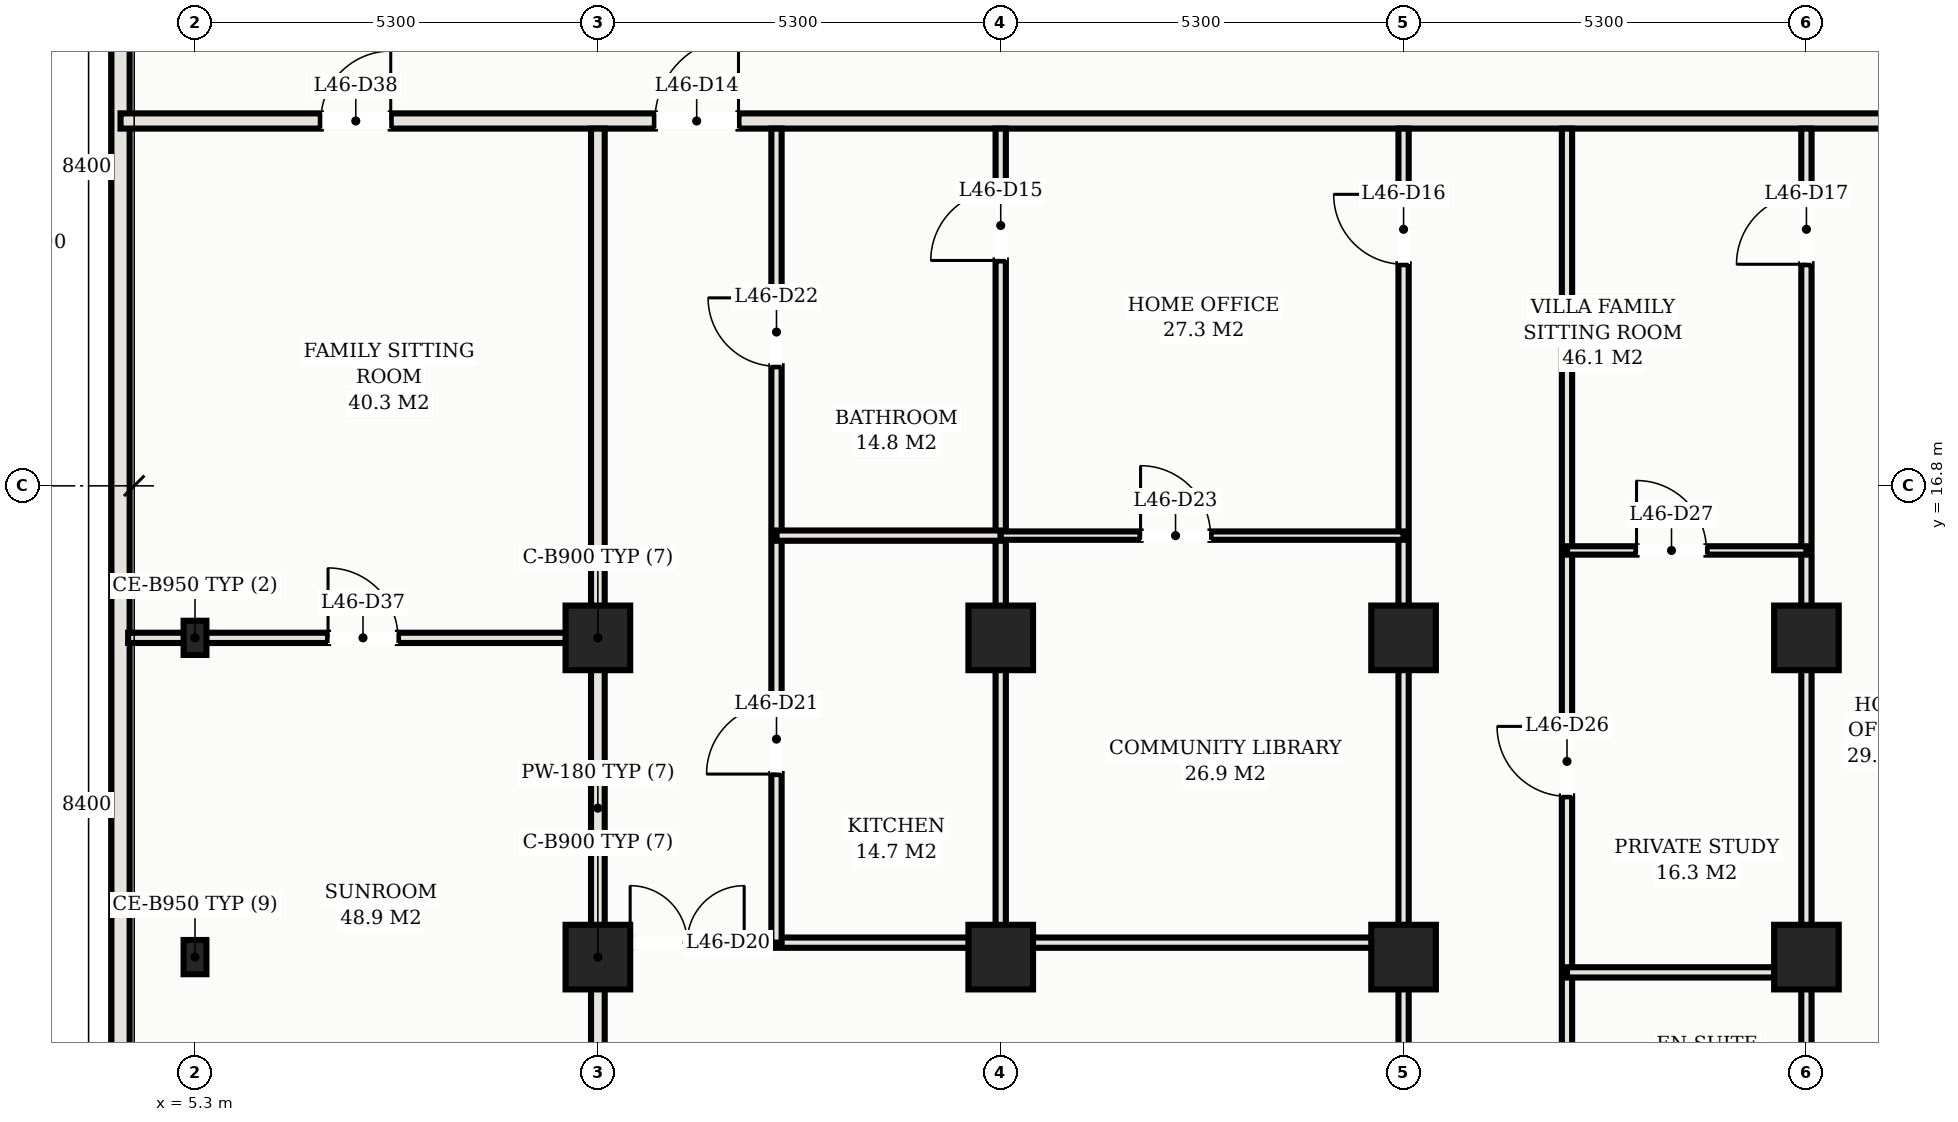
"""IFC4 building model, lengths in metres.
Left out: names, types, materials, properties, quantities, classifications, styles, units other than length and angle.
Written with IfcOpenShell. Run it as: python <this file> out.ifc"""

import sys

from ifc_helpers import new_model, si_unit, direction, frame, frame_2d, origin, origin_2d, place, context, subcontext, project, spatial, rectangle, hollow_rectangle, extrude, element, fill, save


model = new_model("IFC4")
c1 = context("Model", 3, precision=1e-05, world=origin(), true_north=direction((0.0, 1.0)))
c2 = subcontext(c1, "Body", "Model", "MODEL_VIEW")
j1 = project(units=[si_unit("LENGTHUNIT", "METRE"), si_unit("PLANEANGLEUNIT", "RADIAN")], contexts=[c1])
p1 = place(None, origin())
s1 = spatial("IfcSite", under=j1, at=p1, CompositionType="ELEMENT")
p2 = place(p1, origin())
s2 = spatial("IfcBuilding", under=s1, at=p2, CompositionType="ELEMENT")
p3 = place(p2, frame((0.0, 0.0, 168.9)))
s3 = spatial("IfcBuildingStorey", under=s2, at=p3, CompositionType="ELEMENT", Elevation=168.9)
for number, where, z_axis, x_axis in (
    (1, (10.6, 14.8, 0.0), (0.0, 0.0, 1.0), (1.0, 0.0, 0.0)),
    (2, (10.6, 10.6, 0.0), (0.0, 0.0, 1.0), (1.0, 0.0, 0.0)),
    (3, (15.9, 14.8, 0.0), (0.0, 0.0, 1.0), (1.0, 0.0, 0.0)),
    (4, (15.9, 10.6, 0.0), (0.0, 0.0, 1.0), (1.0, 0.0, 0.0)),
    (5, (21.2, 14.8, 0.0), (0.0, 0.0, 1.0), (1.0, 0.0, 0.0)),
    (6, (21.2, 10.6, 0.0), (0.0, 0.0, 1.0), (1.0, 0.0, 0.0)),
    (7, (26.5, 14.8, 0.0), (0.0, 0.0, 1.0), (1.0, 0.0, 0.0)),
    (8, (26.5, 10.6, 0.0), (0.0, 0.0, 1.0), (1.0, 0.0, 0.0)),
):
    element("IfcColumn", number, at=place(p3, frame(where, z_axis=z_axis, x_axis=x_axis)), inside=s3, PredefinedType="COLUMN", context=c2, shape_type="SweptSolid", body=[
        extrude(hollow_rectangle(XDim=0.85, YDim=0.85, WallThickness=0.028, at=origin_2d()), origin(), (0.0, 0.0, 1.0), 3.3),
    ])
for number, where, z_axis, x_axis in (
    (9, (5.3, 10.6, 0.0), (0.0, 0.0, 1.0), (1.0, 0.0, 0.0)),
    (10, (5.3, 14.8, 0.0), (0.0, 0.0, 1.0), (1.0, 0.0, 0.0)),
):
    element("IfcColumn", number, at=place(p3, frame(where, z_axis=z_axis, x_axis=x_axis)), inside=s3, PredefinedType="COLUMN", context=c2, shape_type="SweptSolid", body=[
        extrude(hollow_rectangle(XDim=0.3, YDim=0.45, WallThickness=0.016, at=origin_2d()), origin(), (0.0, 0.0, 1.0), 3.3),
    ])
p4 = place(p3, frame((4.32, 35.93, 0.0), z_axis=(0.0, 0.0, 1.0), x_axis=(0.0, -1.0, 0.0)))
e11 = element("IfcWall", 11, at=p4, inside=s3, PredefinedType="SOLIDWALL", context=c2, shape_type="SweptSolid", body=[
    extrude(rectangle(XDim=27.41, YDim=0.24, at=frame_2d((13.705, 0.0))), origin(), (0.0, 0.0, 1.0), 3.1),
])
p5 = place(p3, frame((4.32, 21.6, 0.0), z_axis=(0.0, 0.0, 1.0), x_axis=(1.0, 0.0, 0.0)))
e12 = element("IfcWall", 12, at=p5, inside=s3, PredefinedType="PARTITIONING", context=c2, shape_type="SweptSolid", body=[
    extrude(rectangle(XDim=44.36, YDim=0.2, at=frame_2d((22.18, 0.0))), origin(), (0.0, 0.0, 1.0), 2.38),
])
p6 = place(p5, frame((7.03, 0.0, 0.0)))
e13 = element("IfcOpeningElement", 13, at=p6, cuts=e12, PredefinedType="OPENING", context=c2, shape_type="SweptSolid", body=[
    extrude(rectangle(XDim=1.1, YDim=2.25, at=frame_2d((0.55, 1.125))), frame((0.0, 0.11, 0.0), z_axis=(0.0, -1.0, 0.0), x_axis=(1.0, 0.0, 0.0)), (0.0, 0.0, 1.0), 0.22),
])
p7 = place(p5, frame((2.635, 0.0, 0.0)))
e14 = element("IfcOpeningElement", 14, at=p7, cuts=e12, PredefinedType="OPENING", context=c2, shape_type="SweptSolid", body=[
    extrude(rectangle(XDim=0.92, YDim=2.15, at=frame_2d((0.46, 1.075))), frame((0.0, 0.11, 0.0), z_axis=(0.0, -1.0, 0.0), x_axis=(1.0, 0.0, 0.0)), (0.0, 0.0, 1.0), 0.22),
])
p8 = place(p5, frame((40.805, 0.0, 0.0)))
e15 = element("IfcOpeningElement", 15, at=p8, cuts=e12, PredefinedType="OPENING", context=c2, shape_type="SweptSolid", body=[
    extrude(rectangle(XDim=0.92, YDim=2.15, at=frame_2d((0.46, 1.075))), frame((0.0, 0.11, 0.0), z_axis=(0.0, -1.0, 0.0), x_axis=(1.0, 0.0, 0.0)), (0.0, 0.0, 1.0), 0.22),
])
p9 = place(p3, frame((10.6, 3.62, 0.0), z_axis=(0.0, 0.0, 1.0), x_axis=(0.0, 1.0, 0.0)))
e16 = element("IfcWall", 16, at=p9, inside=s3, PredefinedType="PARTITIONING", context=c2, shape_type="SweptSolid", body=[
    extrude(rectangle(XDim=17.88, YDim=0.18, at=frame_2d((8.94, 0.0))), origin(), (0.0, 0.0, 1.0), 2.38),
])
p10 = place(p3, frame((15.9, 14.8, 0.0), z_axis=(0.0, 0.0, 1.0), x_axis=(0.0, 1.0, 0.0)))
e17 = element("IfcWall", 17, at=p10, inside=s3, PredefinedType="PARTITIONING", context=c2, shape_type="SweptSolid", body=[
    extrude(rectangle(XDim=6.7, YDim=0.135, at=frame_2d((3.35, 0.0))), origin(), (0.0, 0.0, 1.0), 2.38),
])
p11 = place(p10, frame((4.965, 0.0, 0.0)))
e18 = element("IfcOpeningElement", 18, at=p11, cuts=e17, PredefinedType="OPENING", context=c2, shape_type="SweptSolid", body=[
    extrude(rectangle(XDim=0.92, YDim=2.15, at=frame_2d((0.46, 1.075))), frame((0.0, 0.078, 0.0), z_axis=(0.0, -1.0, 0.0), x_axis=(1.0, 0.0, 0.0)), (0.0, 0.0, 1.0), 0.155),
])
p12 = place(p3, frame((21.2, 2.508, 0.0), z_axis=(0.0, 0.0, 1.0), x_axis=(0.0, 1.0, 0.0)))
e19 = element("IfcWall", 19, at=p12, inside=s3, PredefinedType="PARTITIONING", context=c2, shape_type="SweptSolid", body=[
    extrude(rectangle(XDim=18.992, YDim=0.135, at=frame_2d((9.496, 0.0))), origin(), (0.0, 0.0, 1.0), 2.38),
])
p13 = place(p12, frame((17.207, 0.0, 0.0)))
e20 = element("IfcOpeningElement", 20, at=p13, cuts=e19, PredefinedType="OPENING", context=c2, shape_type="SweptSolid", body=[
    extrude(rectangle(XDim=0.92, YDim=2.15, at=frame_2d((0.46, 1.075))), frame((0.0, 0.078, 0.0), z_axis=(0.0, -1.0, 0.0), x_axis=(1.0, 0.0, 0.0)), (0.0, 0.0, 1.0), 0.155),
])
p14 = place(p3, frame((26.5, 1.82, 0.0), z_axis=(0.0, 0.0, 1.0), x_axis=(0.0, 1.0, 0.0)))
e21 = element("IfcWall", 21, at=p14, inside=s3, PredefinedType="PARTITIONING", context=c2, shape_type="SweptSolid", body=[
    extrude(rectangle(XDim=19.68, YDim=0.135, at=frame_2d((9.84, 0.0))), origin(), (0.0, 0.0, 1.0), 2.38),
])
p15 = place(p14, frame((17.895, 0.0, 0.0)))
e22 = element("IfcOpeningElement", 22, at=p15, cuts=e21, PredefinedType="OPENING", context=c2, shape_type="SweptSolid", body=[
    extrude(rectangle(XDim=0.92, YDim=2.15, at=frame_2d((0.46, 1.075))), frame((0.0, 0.078, 0.0), z_axis=(0.0, -1.0, 0.0), x_axis=(1.0, 0.0, 0.0)), (0.0, 0.0, 1.0), 0.155),
])
p16 = place(p3, frame((15.9, 10.79, 0.0), z_axis=(0.0, 0.0, 1.0), x_axis=(0.0, 1.0, 0.0)))
e23 = element("IfcWall", 23, at=p16, inside=s3, PredefinedType="PARTITIONING", context=c2, shape_type="SweptSolid", body=[
    extrude(rectangle(XDim=4.01, YDim=0.135, at=frame_2d((2.005, 0.0))), origin(), (0.0, 0.0, 1.0), 2.38),
])
p17 = place(p3, frame((10.6, 10.79, 0.0), z_axis=(0.0, 0.0, 1.0), x_axis=(1.0, 0.0, 0.0)))
e24 = element("IfcWall", 24, at=p17, inside=s3, PredefinedType="PARTITIONING", context=c2, shape_type="SweptSolid", body=[
    extrude(rectangle(XDim=10.6, YDim=0.135, at=frame_2d((5.3, 0.0))), origin(), (0.0, 0.0, 1.0), 2.38),
])
p18 = place(p17, frame((0.425, 0.0, 0.0)))
e25 = element("IfcOpeningElement", 25, at=p18, cuts=e24, PredefinedType="OPENING", context=c2, shape_type="SweptSolid", body=[
    extrude(rectangle(XDim=1.5, YDim=2.25, at=frame_2d((0.75, 1.125))), frame((0.0, 0.078, 0.0), z_axis=(0.0, -1.0, 0.0), x_axis=(1.0, 0.0, 0.0)), (0.0, 0.0, 1.0), 0.155),
])
p19 = place(p3, frame((12.95, 10.79, 0.0), z_axis=(0.0, 0.0, 1.0), x_axis=(0.0, 1.0, 0.0)))
e26 = element("IfcWall", 26, at=p19, inside=s3, PredefinedType="PARTITIONING", context=c2, shape_type="SweptSolid", body=[
    extrude(rectangle(XDim=10.71, YDim=0.135, at=frame_2d((5.355, 0.0))), origin(), (0.0, 0.0, 1.0), 2.38),
])
p20 = place(p19, frame((2.218, 0.0, 0.0)))
e27 = element("IfcOpeningElement", 27, at=p20, cuts=e26, PredefinedType="OPENING", context=c2, shape_type="SweptSolid", body=[
    extrude(rectangle(XDim=0.92, YDim=2.15, at=frame_2d((0.46, 1.075))), frame((0.0, 0.078, 0.0), z_axis=(0.0, -1.0, 0.0), x_axis=(1.0, 0.0, 0.0)), (0.0, 0.0, 1.0), 0.155),
])
p21 = place(p19, frame((7.583, 0.0, 0.0)))
e28 = element("IfcOpeningElement", 28, at=p21, cuts=e26, PredefinedType="OPENING", context=c2, shape_type="SweptSolid", body=[
    extrude(rectangle(XDim=0.9, YDim=2.15, at=frame_2d((0.45, 1.075))), frame((0.0, 0.078, 0.0), z_axis=(0.0, -1.0, 0.0), x_axis=(1.0, 0.0, 0.0)), (0.0, 0.0, 1.0), 0.155),
])
p22 = place(p3, frame((12.95, 16.145, 0.0), z_axis=(0.0, 0.0, 1.0), x_axis=(1.0, 0.0, 0.0)))
e29 = element("IfcWall", 29, at=p22, inside=s3, PredefinedType="PARTITIONING", context=c2, shape_type="SweptSolid", body=[
    extrude(rectangle(XDim=2.95, YDim=0.135, at=frame_2d((1.475, 0.0))), origin(), (0.0, 0.0, 1.0), 2.38),
])
p23 = place(p3, frame((15.9, 16.145, 0.0), z_axis=(0.0, 0.0, 1.0), x_axis=(1.0, 0.0, 0.0)))
e30 = element("IfcWall", 30, at=p23, inside=s3, PredefinedType="MOVABLE", context=c2, shape_type="SweptSolid", body=[
    extrude(rectangle(XDim=5.3, YDim=0.11, at=frame_2d((2.65, 0.0))), origin(), (0.0, 0.0, 1.0), 2.38),
])
p24 = place(p23, frame((1.84, 0.0, 0.0)))
e31 = element("IfcOpeningElement", 31, at=p24, cuts=e30, PredefinedType="OPENING", context=c2, shape_type="SweptSolid", body=[
    extrude(rectangle(XDim=0.92, YDim=2.15, at=frame_2d((0.46, 1.075))), frame((0.0, 0.065, 0.0), z_axis=(0.0, -1.0, 0.0), x_axis=(1.0, 0.0, 0.0)), (0.0, 0.0, 1.0), 0.13),
])
p25 = place(p3, frame((23.35, 7.199, 0.0), z_axis=(0.0, 0.0, 1.0), x_axis=(0.0, 1.0, 0.0)))
e32 = element("IfcWall", 32, at=p25, inside=s3, PredefinedType="PARTITIONING", context=c2, shape_type="SweptSolid", body=[
    extrude(rectangle(XDim=14.301, YDim=0.135, at=frame_2d((7.15, 0.0))), origin(), (0.0, 0.0, 1.0), 2.38),
])
p26 = place(p25, frame((5.516, 0.0, 0.0)))
e33 = element("IfcOpeningElement", 33, at=p26, cuts=e32, PredefinedType="OPENING", context=c2, shape_type="SweptSolid", body=[
    extrude(rectangle(XDim=0.92, YDim=2.15, at=frame_2d((0.46, 1.075))), frame((0.0, 0.078, 0.0), z_axis=(0.0, -1.0, 0.0), x_axis=(1.0, 0.0, 0.0)), (0.0, 0.0, 1.0), 0.155),
])
p27 = place(p3, frame((23.35, 10.399, 0.0), z_axis=(0.0, 0.0, 1.0), x_axis=(1.0, 0.0, 0.0)))
e34 = element("IfcWall", 34, at=p27, inside=s3, PredefinedType="PARTITIONING", context=c2, shape_type="SweptSolid", body=[
    extrude(rectangle(XDim=3.15, YDim=0.135, at=frame_2d((1.575, 0.0))), origin(), (0.0, 0.0, 1.0), 2.38),
])
p28 = place(p3, frame((23.35, 15.95, 0.0), z_axis=(0.0, 0.0, 1.0), x_axis=(1.0, 0.0, 0.0)))
e35 = element("IfcWall", 35, at=p28, inside=s3, PredefinedType="MOVABLE", context=c2, shape_type="SweptSolid", body=[
    extrude(rectangle(XDim=3.15, YDim=0.11, at=frame_2d((1.575, 0.0))), origin(), (0.0, 0.0, 1.0), 2.38),
])
p29 = place(p28, frame((0.915, 0.0, 0.0)))
e36 = element("IfcOpeningElement", 36, at=p29, cuts=e35, PredefinedType="OPENING", context=c2, shape_type="SweptSolid", body=[
    extrude(rectangle(XDim=0.92, YDim=2.15, at=frame_2d((0.46, 1.075))), frame((0.0, 0.065, 0.0), z_axis=(0.0, -1.0, 0.0), x_axis=(1.0, 0.0, 0.0)), (0.0, 0.0, 1.0), 0.13),
])
p30 = place(p3, frame((4.42, 14.8, 0.0), z_axis=(0.0, 0.0, 1.0), x_axis=(1.0, 0.0, 0.0)))
e37 = element("IfcWall", 37, at=p30, inside=s3, PredefinedType="PARTITIONING", context=c2, shape_type="SweptSolid", body=[
    extrude(rectangle(XDim=6.18, YDim=0.135, at=frame_2d((3.09, 0.0))), origin(), (0.0, 0.0, 1.0), 2.38),
])
p31 = place(p30, frame((2.63, 0.0, 0.0)))
e38 = element("IfcOpeningElement", 38, at=p31, cuts=e37, PredefinedType="OPENING", context=c2, shape_type="SweptSolid", body=[
    extrude(rectangle(XDim=0.92, YDim=2.15, at=frame_2d((0.46, 1.075))), frame((0.0, 0.078, 0.0), z_axis=(0.0, -1.0, 0.0), x_axis=(1.0, 0.0, 0.0)), (0.0, 0.0, 1.0), 0.155),
])
p32 = place(p6, origin())
e39 = element("IfcDoor", 39, at=p32, inside=s3, OperationType="SINGLE_SWING_RIGHT", PredefinedType="DOOR", context=c2, shape_type="SweptSolid", body=[
    extrude(rectangle(XDim=1.1, YDim=2.25, at=frame_2d((0.55, 1.125))), frame((0.0, 0.025, 0.0), z_axis=(0.0, -1.0, 0.0), x_axis=(1.0, 0.0, 0.0)), (0.0, 0.0, 1.0), 0.05),
])
fill(e13, e39)
p33 = place(p11, origin())
e40 = element("IfcDoor", 40, at=p33, inside=s3, OperationType="SINGLE_SWING_LEFT", PredefinedType="DOOR", context=c2, shape_type="SweptSolid", body=[
    extrude(rectangle(XDim=0.92, YDim=2.15, at=frame_2d((0.46, 1.075))), frame((0.0, 0.025, 0.0), z_axis=(0.0, -1.0, 0.0), x_axis=(1.0, 0.0, 0.0)), (0.0, 0.0, 1.0), 0.05),
])
fill(e18, e40)
p34 = place(p13, origin())
e41 = element("IfcDoor", 41, at=p34, inside=s3, OperationType="SINGLE_SWING_RIGHT", PredefinedType="DOOR", context=c2, shape_type="SweptSolid", body=[
    extrude(rectangle(XDim=0.92, YDim=2.15, at=frame_2d((0.46, 1.075))), frame((0.0, 0.025, 0.0), z_axis=(0.0, -1.0, 0.0), x_axis=(1.0, 0.0, 0.0)), (0.0, 0.0, 1.0), 0.05),
])
fill(e20, e41)
p35 = place(p15, origin())
e42 = element("IfcDoor", 42, at=p35, inside=s3, OperationType="SINGLE_SWING_LEFT", PredefinedType="DOOR", context=c2, shape_type="SweptSolid", body=[
    extrude(rectangle(XDim=0.92, YDim=2.15, at=frame_2d((0.46, 1.075))), frame((0.0, 0.025, 0.0), z_axis=(0.0, -1.0, 0.0), x_axis=(1.0, 0.0, 0.0)), (0.0, 0.0, 1.0), 0.05),
])
fill(e22, e42)
p36 = place(p18, origin())
e43 = element("IfcDoor", 43, at=p36, inside=s3, OperationType="DOUBLE_DOOR_SINGLE_SWING", PredefinedType="DOOR", context=c2, shape_type="SweptSolid", body=[
    extrude(rectangle(XDim=1.5, YDim=2.25, at=frame_2d((0.75, 1.125))), frame((0.0, 0.025, 0.0), z_axis=(0.0, -1.0, 0.0), x_axis=(1.0, 0.0, 0.0)), (0.0, 0.0, 1.0), 0.05),
])
fill(e25, e43)
p37 = place(p20, origin())
e44 = element("IfcDoor", 44, at=p37, inside=s3, OperationType="SINGLE_SWING_LEFT", PredefinedType="DOOR", context=c2, shape_type="SweptSolid", body=[
    extrude(rectangle(XDim=0.92, YDim=2.15, at=frame_2d((0.46, 1.075))), frame((0.0, 0.025, 0.0), z_axis=(0.0, -1.0, 0.0), x_axis=(1.0, 0.0, 0.0)), (0.0, 0.0, 1.0), 0.05),
])
fill(e27, e44)
p38 = place(p21, origin())
e45 = element("IfcDoor", 45, at=p38, inside=s3, OperationType="SINGLE_SWING_RIGHT", PredefinedType="DOOR", context=c2, shape_type="SweptSolid", body=[
    extrude(rectangle(XDim=0.9, YDim=2.15, at=frame_2d((0.45, 1.075))), frame((0.0, 0.025, 0.0), z_axis=(0.0, -1.0, 0.0), x_axis=(1.0, 0.0, 0.0)), (0.0, 0.0, 1.0), 0.05),
])
fill(e28, e45)
p39 = place(p24, origin())
e46 = element("IfcDoor", 46, at=p39, inside=s3, OperationType="SINGLE_SWING_LEFT", PredefinedType="DOOR", context=c2, shape_type="SweptSolid", body=[
    extrude(rectangle(XDim=0.92, YDim=2.15, at=frame_2d((0.46, 1.075))), frame((0.0, 0.025, 0.0), z_axis=(0.0, -1.0, 0.0), x_axis=(1.0, 0.0, 0.0)), (0.0, 0.0, 1.0), 0.05),
])
fill(e31, e46)
p40 = place(p26, origin())
e47 = element("IfcDoor", 47, at=p40, inside=s3, OperationType="SINGLE_SWING_RIGHT", PredefinedType="DOOR", context=c2, shape_type="SweptSolid", body=[
    extrude(rectangle(XDim=0.92, YDim=2.15, at=frame_2d((0.46, 1.075))), frame((0.0, 0.025, 0.0), z_axis=(0.0, -1.0, 0.0), x_axis=(1.0, 0.0, 0.0)), (0.0, 0.0, 1.0), 0.05),
])
fill(e33, e47)
p41 = place(p29, origin())
e48 = element("IfcDoor", 48, at=p41, inside=s3, OperationType="SINGLE_SWING_LEFT", PredefinedType="DOOR", context=c2, shape_type="SweptSolid", body=[
    extrude(rectangle(XDim=0.92, YDim=2.15, at=frame_2d((0.46, 1.075))), frame((0.0, 0.025, 0.0), z_axis=(0.0, -1.0, 0.0), x_axis=(1.0, 0.0, 0.0)), (0.0, 0.0, 1.0), 0.05),
])
fill(e36, e48)
p42 = place(p31, origin())
e49 = element("IfcDoor", 49, at=p42, inside=s3, OperationType="SINGLE_SWING_LEFT", PredefinedType="DOOR", context=c2, shape_type="SweptSolid", body=[
    extrude(rectangle(XDim=0.92, YDim=2.15, at=frame_2d((0.46, 1.075))), frame((0.0, 0.025, 0.0), z_axis=(0.0, -1.0, 0.0), x_axis=(1.0, 0.0, 0.0)), (0.0, 0.0, 1.0), 0.05),
])
fill(e38, e49)
p43 = place(p7, origin())
e50 = element("IfcDoor", 50, at=p43, inside=s3, OperationType="SINGLE_SWING_RIGHT", PredefinedType="DOOR", context=c2, shape_type="SweptSolid", body=[
    extrude(rectangle(XDim=0.92, YDim=2.15, at=frame_2d((0.46, 1.075))), frame((0.0, 0.025, 0.0), z_axis=(0.0, -1.0, 0.0), x_axis=(1.0, 0.0, 0.0)), (0.0, 0.0, 1.0), 0.05),
])
fill(e14, e50)
save(model, sys.argv[1])
